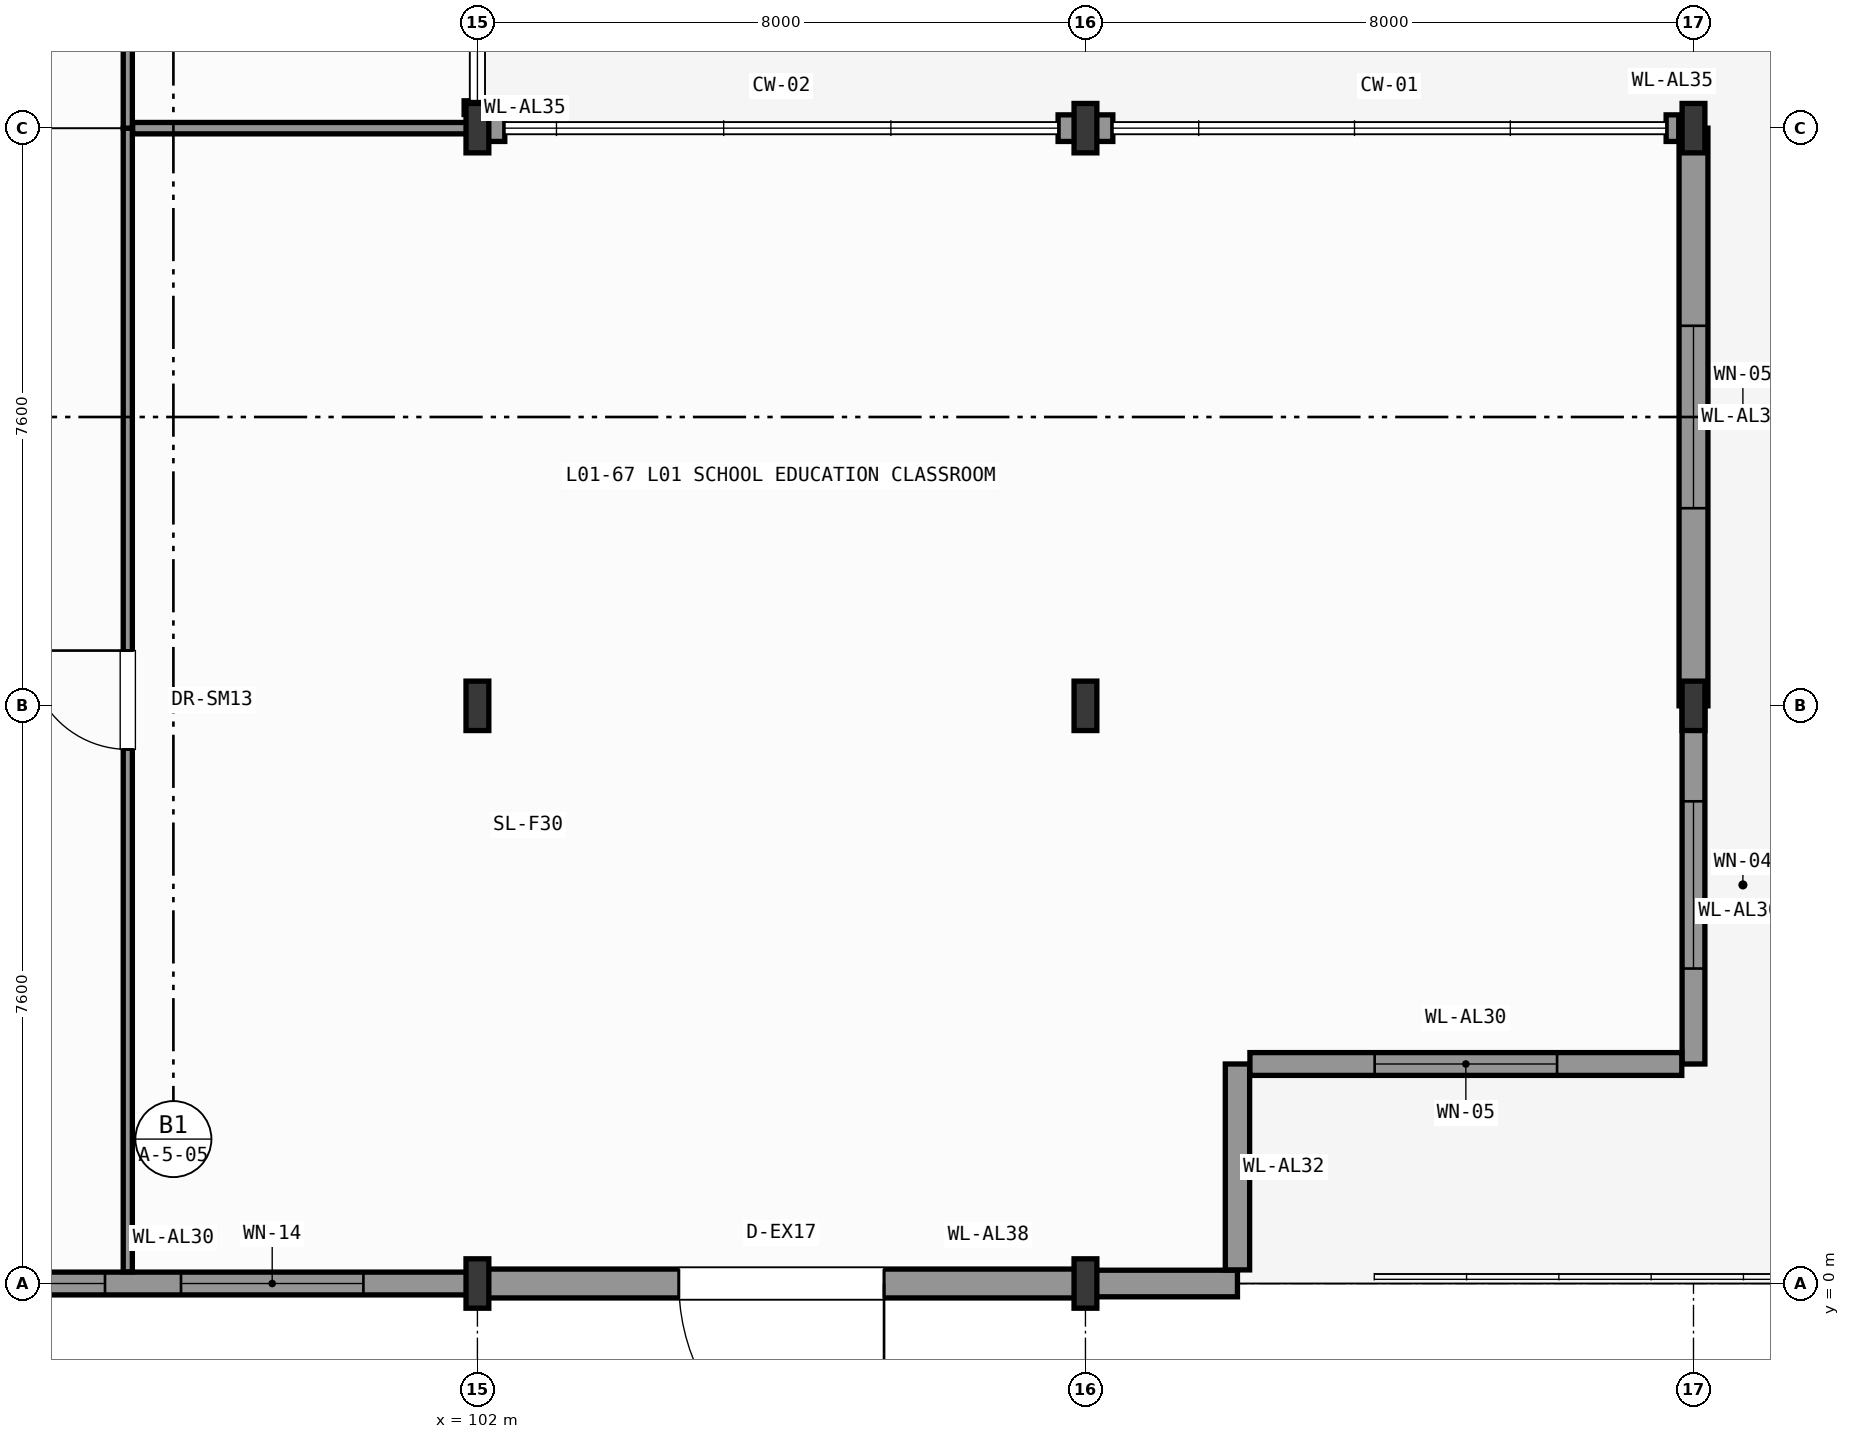
"""IFC4 building model, lengths in metres.
Left out: names, types, materials, properties, quantities, classifications, styles, units other than length and angle.
Written with IfcOpenShell. Run it as: python <this file> out.ifc"""

import sys

from ifc_helpers import new_model, si_unit, direction, frame, frame_2d, origin, origin_2d, place, context, subcontext, project, spatial, rectangle, i_section, extrude, element, fill, save


model = new_model("IFC4")
c1 = context("Model", 3, precision=1e-05, world=origin(), true_north=direction((0.0, 1.0)))
c2 = subcontext(c1, "Body", "Model", "MODEL_VIEW")
j1 = project(units=[si_unit("LENGTHUNIT", "METRE"), si_unit("PLANEANGLEUNIT", "RADIAN")], contexts=[c1])
p1 = place(None, origin())
s1 = spatial("IfcSite", under=j1, at=p1, CompositionType="ELEMENT")
p2 = place(p1, origin())
s2 = spatial("IfcBuilding", under=s1, at=p2, CompositionType="ELEMENT")
p3 = place(p2, origin())
s3 = spatial("IfcBuildingStorey", under=s2, at=p3, CompositionType="ELEMENT", Elevation=0.0)
for number, where, z_axis, x_axis in (
    (1, (102.0, 0.0, 0.0), (0.0, 0.0, 1.0), (1.0, 0.0, 0.0)),
    (2, (102.0, 7.6, 0.0), (0.0, 0.0, 1.0), (1.0, 0.0, 0.0)),
    (3, (102.0, 15.2, 0.0), (0.0, 0.0, 1.0), (1.0, 0.0, 0.0)),
    (4, (110.0, 0.0, 0.0), (0.0, 0.0, 1.0), (1.0, 0.0, 0.0)),
    (5, (110.0, 7.6, 0.0), (0.0, 0.0, 1.0), (1.0, 0.0, 0.0)),
    (6, (110.0, 15.2, 0.0), (0.0, 0.0, 1.0), (1.0, 0.0, 0.0)),
    (7, (118.0, 7.6, 0.0), (0.0, 0.0, 1.0), (1.0, 0.0, 0.0)),
    (8, (118.0, 15.2, 0.0), (0.0, 0.0, 1.0), (1.0, 0.0, 0.0)),
):
    element("IfcColumn", number, at=place(p3, frame(where, z_axis=z_axis, x_axis=x_axis)), inside=s3, PredefinedType="COLUMN", context=c2, shape_type="SweptSolid", body=[
        extrude(i_section(OverallWidth=0.3, OverallDepth=0.65, WebThickness=0.016, FlangeThickness=0.031, FilletRadius=0.027, at=origin_2d()), origin(), (0.0, 0.0, 1.0), 7.8),
    ])
p4 = place(p3, frame((118.0, 7.6, 0.0), z_axis=(0.0, 0.0, 1.0), x_axis=(0.0, -1.0, 0.0)))
e9 = element("IfcWall", 9, at=p4, inside=s3, PredefinedType="SOLIDWALL", context=c2, shape_type="SweptSolid", body=[
    extrude(rectangle(XDim=4.712, YDim=0.3, at=frame_2d((2.356, 0.0))), origin(), (0.0, 0.0, 1.0), 7.54),
])
p5 = place(p4, frame((1.256, 0.0, 0.95)))
e10 = element("IfcOpeningElement", 10, at=p5, cuts=e9, PredefinedType="OPENING", context=c2, shape_type="SweptSolid", body=[
    extrude(rectangle(XDim=2.2, YDim=4.2, at=frame_2d((1.1, 2.1))), frame((0.0, 0.16, 0.0), z_axis=(0.0, -1.0, 0.0), x_axis=(1.0, 0.0, 0.0)), (0.0, 0.0, 1.0), 0.32),
])
p6 = place(p3, frame((118.0, 15.2, 0.0), z_axis=(0.0, 0.0, 1.0), x_axis=(0.0, -1.0, 0.0)))
e11 = element("IfcWall", 11, at=p6, inside=s3, PredefinedType="SOLIDWALL", context=c2, shape_type="SweptSolid", body=[
    extrude(rectangle(XDim=7.6, YDim=0.38, at=frame_2d((3.8, 0.0))), origin(), (0.0, 0.0, 1.0), 7.025),
])
p7 = place(p6, frame((2.6, 0.0, 0.95)))
e12 = element("IfcOpeningElement", 12, at=p7, cuts=e11, PredefinedType="OPENING", context=c2, shape_type="SweptSolid", body=[
    extrude(rectangle(XDim=2.4, YDim=4.6, at=frame_2d((1.2, 2.3))), frame((0.0, 0.2, 0.0), z_axis=(0.0, -1.0, 0.0), x_axis=(1.0, 0.0, 0.0)), (0.0, 0.0, 1.0), 0.4),
])
p8 = place(p3, frame((117.806, 15.2, 0.0), z_axis=(0.0, 0.0, 1.0), x_axis=(-1.0, 0.0, 0.0)))
e13 = element("IfcWall", 13, at=p8, inside=s3, PredefinedType="SOLIDWALL", context=c2, shape_type="SweptSolid", body=[
    extrude(rectangle(XDim=0.166, YDim=0.35, at=frame_2d((0.083, 0.0))), origin(), (0.0, 0.0, 1.0), 7.54),
])
p9 = place(p3, frame((110.36, 15.2, 0.0), z_axis=(0.0, 0.0, 1.0), x_axis=(-1.0, 0.0, 0.0)))
e14 = element("IfcWall", 14, at=p9, inside=s3, PredefinedType="SOLIDWALL", context=c2, shape_type="SweptSolid", body=[
    extrude(rectangle(XDim=0.36, YDim=0.35, at=frame_2d((0.18, 0.0))), origin(), (0.0, 0.0, 1.0), 7.205),
])
for number, where, z_axis, x_axis in (
    (15, (110.0, 15.2, 0.0), (0.0, 0.0, 1.0), (-1.0, 0.0, 0.0)),
    (16, (102.36, 15.2, 0.0), (0.0, 0.0, 1.0), (-1.0, 0.0, 0.0)),
):
    element("IfcWall", number, at=place(p3, frame(where, z_axis=z_axis, x_axis=x_axis)), inside=s3, PredefinedType="SOLIDWALL", context=c2, shape_type="SweptSolid", body=[
        extrude(rectangle(XDim=0.36, YDim=0.35, at=frame_2d((0.18, 0.0))), origin(), (0.0, 0.0, 1.0), 7.245),
    ])
p10 = place(p3, frame((102.0, 15.379, 0.0), z_axis=(0.0, 0.0, 1.0), x_axis=(0.0, 1.0, 0.0)))
e17 = element("IfcWall", 17, at=p10, inside=s3, PredefinedType="SOLIDWALL", context=c2, shape_type="SweptSolid", body=[
    extrude(rectangle(XDim=0.181, YDim=0.35, at=frame_2d((0.091, 0.0))), origin(), (0.0, 0.0, 1.0), 7.54),
])
p11 = place(p3, frame((102.0, 0.0, 0.0), z_axis=(0.0, 0.0, 1.0), x_axis=(-1.0, 0.0, 0.0)))
e18 = element("IfcWall", 18, at=p11, inside=s3, PredefinedType="SOLIDWALL", context=c2, shape_type="SweptSolid", body=[
    extrude(rectangle(XDim=8.0, YDim=0.3, at=frame_2d((4.0, 0.0))), origin(), (0.0, 0.0, 1.0), 7.135),
])
p12 = place(p11, frame((1.5, 0.0, 0.95)))
e19 = element("IfcOpeningElement", 19, at=p12, cuts=e18, PredefinedType="OPENING", context=c2, shape_type="SweptSolid", body=[
    extrude(rectangle(XDim=2.4, YDim=3.0, at=frame_2d((1.2, 1.5))), frame((0.0, 0.16, 0.0), z_axis=(0.0, -1.0, 0.0), x_axis=(1.0, 0.0, 0.0)), (0.0, 0.0, 1.0), 0.32),
])
p13 = place(p11, frame((4.9, 0.0, 0.95)))
e20 = element("IfcOpeningElement", 20, at=p13, cuts=e18, PredefinedType="OPENING", context=c2, shape_type="SweptSolid", body=[
    extrude(rectangle(XDim=2.4, YDim=3.0, at=frame_2d((1.2, 1.5))), frame((0.0, 0.16, 0.0), z_axis=(0.0, -1.0, 0.0), x_axis=(1.0, 0.0, 0.0)), (0.0, 0.0, 1.0), 0.32),
])
p14 = place(p3, frame((110.0, 0.0, 0.0), z_axis=(0.0, 0.0, 1.0), x_axis=(-1.0, 0.0, 0.0)))
e21 = element("IfcWall", 21, at=p14, inside=s3, PredefinedType="SOLIDWALL", context=c2, shape_type="SweptSolid", body=[
    extrude(rectangle(XDim=8.0, YDim=0.38, at=frame_2d((4.0, 0.0))), origin(), (0.0, 0.0, 1.0), 7.135),
])
p15 = place(p14, frame((2.65, 0.0, 0.0)))
e22 = element("IfcOpeningElement", 22, at=p15, cuts=e21, PredefinedType="OPENING", context=c2, shape_type="SweptSolid", body=[
    extrude(rectangle(XDim=2.7, YDim=2.95, at=frame_2d((1.35, 1.475))), frame((0.0, 0.2, 0.0), z_axis=(0.0, -1.0, 0.0), x_axis=(1.0, 0.0, 0.0)), (0.0, 0.0, 1.0), 0.4),
])
p16 = place(p3, frame((112.0, 0.0, 0.0), z_axis=(0.0, 0.0, 1.0), x_axis=(-1.0, 0.0, 0.0)))
e23 = element("IfcWall", 23, at=p16, inside=s3, PredefinedType="SOLIDWALL", context=c2, shape_type="SweptSolid", body=[
    extrude(rectangle(XDim=2.0, YDim=0.35, at=frame_2d((1.0, 0.0))), origin(), (0.0, 0.0, 1.0), 7.54),
])
p17 = place(p3, frame((112.0, 2.888, 0.0), z_axis=(0.0, 0.0, 1.0), x_axis=(0.0, -1.0, 0.0)))
e24 = element("IfcWall", 24, at=p17, inside=s3, PredefinedType="SOLIDWALL", context=c2, shape_type="SweptSolid", body=[
    extrude(rectangle(XDim=2.709, YDim=0.32, at=frame_2d((1.354, 0.0))), origin(), (0.0, 0.0, 1.0), 7.54),
])
p18 = place(p3, frame((117.846, 2.888, 0.0), z_axis=(0.0, 0.0, 1.0), x_axis=(-1.0, 0.0, 0.0)))
e25 = element("IfcWall", 25, at=p18, inside=s3, PredefinedType="SOLIDWALL", context=c2, shape_type="SweptSolid", body=[
    extrude(rectangle(XDim=5.682, YDim=0.3, at=frame_2d((2.841, 0.0))), origin(), (0.0, 0.0, 1.0), 7.54),
])
p19 = place(p18, frame((1.641, 0.0, 0.95)))
e26 = element("IfcOpeningElement", 26, at=p19, cuts=e25, PredefinedType="OPENING", context=c2, shape_type="SweptSolid", body=[
    extrude(rectangle(XDim=2.4, YDim=4.6, at=frame_2d((1.2, 2.3))), frame((0.0, 0.16, 0.0), z_axis=(0.0, -1.0, 0.0), x_axis=(1.0, 0.0, 0.0)), (0.0, 0.0, 1.0), 0.32),
])
p20 = place(p3, frame((97.4, 0.154, 0.0), z_axis=(0.0, 0.0, 1.0), x_axis=(0.0, 1.0, 0.0)))
e27 = element("IfcWall", 27, at=p20, inside=s3, PredefinedType="PARTITIONING", context=c2, shape_type="SweptSolid", body=[
    extrude(rectangle(XDim=15.046, YDim=0.12, at=frame_2d((7.523, 0.0))), origin(), (0.0, 0.0, 1.0), 7.54),
])
p21 = place(p20, frame((6.873, 0.0, 0.0)))
e28 = element("IfcOpeningElement", 28, at=p21, cuts=e27, PredefinedType="OPENING", context=c2, shape_type="SweptSolid", body=[
    extrude(rectangle(XDim=1.3, YDim=2.25, at=frame_2d((0.65, 1.125))), frame((0.0, 0.07, 0.0), z_axis=(0.0, -1.0, 0.0), x_axis=(1.0, 0.0, 0.0)), (0.0, 0.0, 1.0), 0.14),
])
p22 = place(p3, frame((97.464, 15.2, 0.0), z_axis=(0.0, 0.0, 1.0), x_axis=(1.0, 0.0, 0.0)))
e29 = element("IfcWall", 29, at=p22, inside=s3, PredefinedType="PARTITIONING", context=c2, shape_type="SweptSolid", body=[
    extrude(rectangle(XDim=4.536, YDim=0.15, at=frame_2d((2.268, 0.0))), origin(), (0.0, 0.0, 1.0), 7.025),
])
p23 = place(p3, frame((97.4, 15.2, 0.0), z_axis=(0.0, 0.0, 1.0), x_axis=(0.0, 1.0, 0.0)))
e30 = element("IfcWall", 30, at=p23, inside=s3, PredefinedType="PARTITIONING", context=c2, shape_type="SweptSolid", body=[
    extrude(rectangle(XDim=30.4, YDim=0.12, at=frame_2d((15.2, 0.0))), origin(), (0.0, 0.0, 1.0), 7.54),
])
p24 = place(p23, frame((14.1, 0.0, 0.0)))
e31 = element("IfcOpeningElement", 31, at=p24, cuts=e30, PredefinedType="OPENING", context=c2, shape_type="SweptSolid", body=[
    extrude(rectangle(XDim=2.2, YDim=2.6, at=frame_2d((1.1, 1.3))), frame((0.0, 0.07, 0.0), z_axis=(0.0, -1.0, 0.0), x_axis=(1.0, 0.0, 0.0)), (0.0, 0.0, 1.0), 0.14),
])
p25 = place(p5, origin())
e32 = element("IfcWindow", 32, at=p25, inside=s3, PartitioningType="SINGLE_PANEL", PredefinedType="WINDOW", context=c2, shape_type="SweptSolid", body=[
    extrude(rectangle(XDim=2.2, YDim=4.2, at=frame_2d((1.1, 2.1))), frame((0.0, 0.03, 0.0), z_axis=(0.0, -1.0, 0.0), x_axis=(1.0, 0.0, 0.0)), (0.0, 0.0, 1.0), 0.06),
])
fill(e10, e32)
p26 = place(p7, origin())
e33 = element("IfcWindow", 33, at=p26, inside=s3, PartitioningType="SINGLE_PANEL", PredefinedType="WINDOW", context=c2, shape_type="SweptSolid", body=[
    extrude(rectangle(XDim=2.4, YDim=4.6, at=frame_2d((1.2, 2.3))), frame((0.0, 0.03, 0.0), z_axis=(0.0, -1.0, 0.0), x_axis=(1.0, 0.0, 0.0)), (0.0, 0.0, 1.0), 0.06),
])
fill(e12, e33)
p27 = place(p12, origin())
e34 = element("IfcWindow", 34, at=p27, inside=s3, PartitioningType="SINGLE_PANEL", PredefinedType="WINDOW", context=c2, shape_type="SweptSolid", body=[
    extrude(rectangle(XDim=2.4, YDim=3.0, at=frame_2d((1.2, 1.5))), frame((0.0, 0.03, 0.0), z_axis=(0.0, -1.0, 0.0), x_axis=(1.0, 0.0, 0.0)), (0.0, 0.0, 1.0), 0.06),
])
fill(e19, e34)
p28 = place(p13, origin())
e35 = element("IfcWindow", 35, at=p28, inside=s3, PartitioningType="SINGLE_PANEL", PredefinedType="WINDOW", context=c2, shape_type="SweptSolid", body=[
    extrude(rectangle(XDim=2.4, YDim=3.0, at=frame_2d((1.2, 1.5))), frame((0.0, 0.03, 0.0), z_axis=(0.0, -1.0, 0.0), x_axis=(1.0, 0.0, 0.0)), (0.0, 0.0, 1.0), 0.06),
])
fill(e20, e35)
p29 = place(p15, origin())
e36 = element("IfcDoor", 36, at=p29, inside=s3, OperationType="SINGLE_SWING_LEFT", PredefinedType="DOOR", context=c2, shape_type="SweptSolid", body=[
    extrude(rectangle(XDim=2.7, YDim=2.95, at=frame_2d((1.35, 1.475))), frame((0.0, 0.025, 0.0), z_axis=(0.0, -1.0, 0.0), x_axis=(1.0, 0.0, 0.0)), (0.0, 0.0, 1.0), 0.05),
])
fill(e22, e36)
p30 = place(p19, origin())
e37 = element("IfcWindow", 37, at=p30, inside=s3, PartitioningType="SINGLE_PANEL", PredefinedType="WINDOW", context=c2, shape_type="SweptSolid", body=[
    extrude(rectangle(XDim=2.4, YDim=4.6, at=frame_2d((1.2, 2.3))), frame((0.0, 0.03, 0.0), z_axis=(0.0, -1.0, 0.0), x_axis=(1.0, 0.0, 0.0)), (0.0, 0.0, 1.0), 0.06),
])
fill(e26, e37)
p31 = place(p21, origin())
e38 = element("IfcDoor", 38, at=p31, inside=s3, OperationType="SINGLE_SWING_RIGHT", PredefinedType="DOOR", context=c2, shape_type="SweptSolid", body=[
    extrude(rectangle(XDim=1.3, YDim=2.25, at=frame_2d((0.65, 1.125))), frame((0.0, 0.025, 0.0), z_axis=(0.0, -1.0, 0.0), x_axis=(1.0, 0.0, 0.0)), (0.0, 0.0, 1.0), 0.05),
])
fill(e28, e38)
save(model, sys.argv[1])
